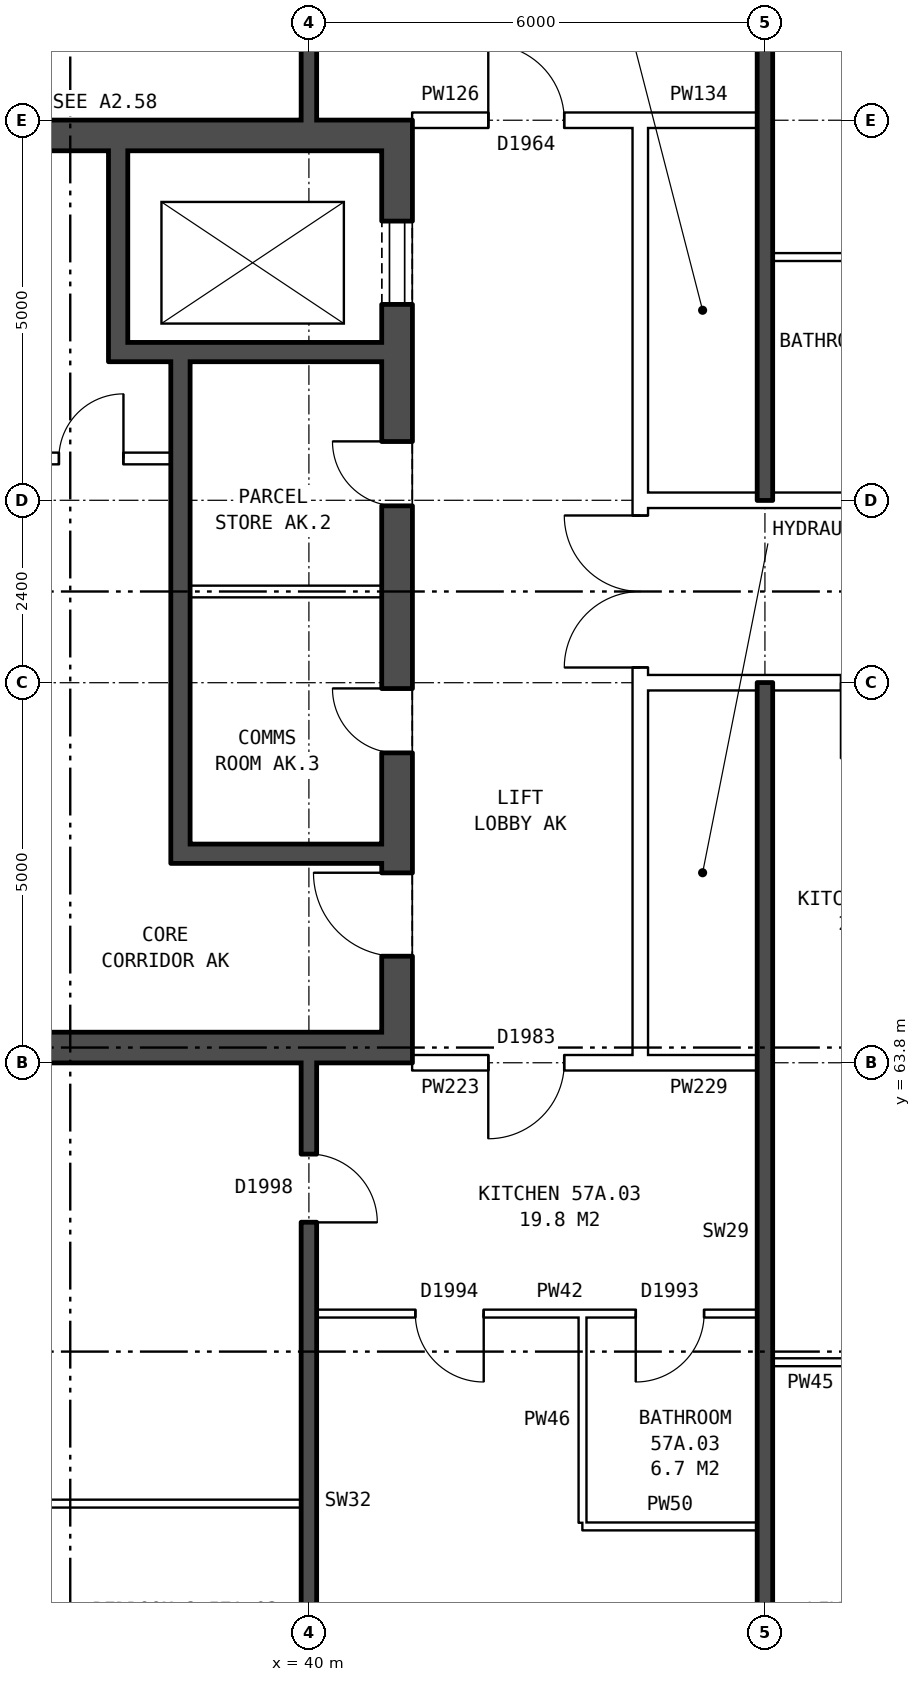
"""IFC4 building model, lengths in metres.
Left out: names, types, materials, properties, quantities, classifications, styles, units other than length and angle.
Written with IfcOpenShell. Run it as: python <this file> out.ifc"""

import sys

from ifc_helpers import new_model, si_unit, direction, frame, frame_2d, origin, place, context, subcontext, project, spatial, rectangle, extrude, element, fill, save


model = new_model("IFC4")
c1 = context("Model", 3, precision=1e-05, world=origin(), true_north=direction((0.0, 1.0)))
c2 = subcontext(c1, "Body", "Model", "MODEL_VIEW")
j1 = project(units=[si_unit("LENGTHUNIT", "METRE"), si_unit("PLANEANGLEUNIT", "RADIAN")], contexts=[c1])
p1 = place(None, origin())
s1 = spatial("IfcSite", under=j1, at=p1, CompositionType="ELEMENT")
p2 = place(p1, origin())
s2 = spatial("IfcBuilding", under=s1, at=p2, CompositionType="ELEMENT")
p3 = place(p2, frame((0.0, 0.0, 202.8)))
s3 = spatial("IfcBuildingStorey", under=s2, at=p3, CompositionType="ELEMENT", Elevation=202.8)
p4 = place(p3, frame((41.16, 76.2, 0.0), z_axis=(0.0, 0.0, 1.0), x_axis=(0.0, -1.0, 0.0)))
e1 = element("IfcWall", 1, at=p4, inside=s3, PredefinedType="SHEAR", context=c2, shape_type="SweptSolid", body=[
    extrude(rectangle(XDim=12.4, YDim=0.4, at=frame_2d((6.2, 0.0))), origin(), (0.0, 0.0, 1.0), 2.85),
])
p5 = place(p4, frame((1.325, 0.0, 0.0)))
e2 = element("IfcOpeningElement", 2, at=p5, cuts=e1, PredefinedType="OPENING", context=c2, shape_type="SweptSolid", body=[
    extrude(rectangle(XDim=1.1, YDim=2.1, at=frame_2d((0.55, 1.05))), frame((0.0, 0.21, 0.0), z_axis=(0.0, -1.0, 0.0), x_axis=(1.0, 0.0, 0.0)), (0.0, 0.0, 1.0), 0.42),
])
p6 = place(p4, frame((4.225, 0.0, 0.0)))
e3 = element("IfcOpeningElement", 3, at=p6, cuts=e1, PredefinedType="OPENING", context=c2, shape_type="SweptSolid", body=[
    extrude(rectangle(XDim=0.85, YDim=2.1, at=frame_2d((0.425, 1.05))), frame((0.0, 0.21, 0.0), z_axis=(0.0, -1.0, 0.0), x_axis=(1.0, 0.0, 0.0)), (0.0, 0.0, 1.0), 0.42),
])
p7 = place(p4, frame((7.475, 0.0, 0.0)))
e4 = element("IfcOpeningElement", 4, at=p7, cuts=e1, PredefinedType="OPENING", context=c2, shape_type="SweptSolid", body=[
    extrude(rectangle(XDim=0.85, YDim=2.1, at=frame_2d((0.425, 1.05))), frame((0.0, 0.21, 0.0), z_axis=(0.0, -1.0, 0.0), x_axis=(1.0, 0.0, 0.0)), (0.0, 0.0, 1.0), 0.42),
])
p8 = place(p4, frame((9.9, 0.0, 0.0)))
e5 = element("IfcOpeningElement", 5, at=p8, cuts=e1, PredefinedType="OPENING", context=c2, shape_type="SweptSolid", body=[
    extrude(rectangle(XDim=1.1, YDim=2.1, at=frame_2d((0.55, 1.05))), frame((0.0, 0.21, 0.0), z_axis=(0.0, -1.0, 0.0), x_axis=(1.0, 0.0, 0.0)), (0.0, 0.0, 1.0), 0.42),
])
for number, where, z_axis, x_axis in (
    (6, (40.96, 76.0, 0.0), (0.0, 0.0, 1.0), (-1.0, 0.0, 0.0)),
    (7, (40.96, 64.0, 0.0), (0.0, 0.0, 1.0), (-1.0, 0.0, 0.0)),
):
    element("IfcWall", number, at=place(p3, frame(where, z_axis=z_axis, x_axis=x_axis)), inside=s3, PredefinedType="SHEAR", context=c2, shape_type="SweptSolid", body=[
        extrude(rectangle(XDim=8.2, YDim=0.4, at=frame_2d((4.1, 0.0))), origin(), (0.0, 0.0, 1.0), 2.85),
    ])
p9 = place(p3, frame((40.96, 73.15, 0.0), z_axis=(0.0, 0.0, 1.0), x_axis=(-1.0, 0.0, 0.0)))
e8 = element("IfcWall", 8, at=p9, inside=s3, PredefinedType="SHEAR", context=c2, shape_type="SweptSolid", body=[
    extrude(rectangle(XDim=3.595, YDim=0.25, at=frame_2d((1.797, 0.0))), origin(), (0.0, 0.0, 1.0), 2.85),
])
p10 = place(p3, frame((38.185, 71.75, 0.0), z_axis=(0.0, 0.0, 1.0), x_axis=(-1.0, 0.0, 0.0)))
e9 = element("IfcWall", 9, at=p10, inside=s3, PredefinedType="PARTITIONING", context=c2, shape_type="SweptSolid", body=[
    extrude(rectangle(XDim=2.1, YDim=0.15, at=frame_2d((1.05, 0.0))), origin(), (0.0, 0.0, 1.0), 2.85),
])
p11 = place(p10, frame((0.625, 0.0, 0.0)))
e10 = element("IfcOpeningElement", 10, at=p11, cuts=e9, PredefinedType="OPENING", context=c2, shape_type="SweptSolid", body=[
    extrude(rectangle(XDim=0.85, YDim=2.1, at=frame_2d((0.425, 1.05))), frame((0.0, 0.085, 0.0), z_axis=(0.0, -1.0, 0.0), x_axis=(1.0, 0.0, 0.0)), (0.0, 0.0, 1.0), 0.17),
])
p12 = place(p3, frame((40.96, 70.0, 0.0), z_axis=(0.0, 0.0, 1.0), x_axis=(-1.0, 0.0, 0.0)))
e11 = element("IfcWall", 11, at=p12, inside=s3, PredefinedType="PARTITIONING", context=c2, shape_type="SweptSolid", body=[
    extrude(rectangle(XDim=2.525, YDim=0.15, at=frame_2d((1.262, 0.0))), origin(), (0.0, 0.0, 1.0), 2.85),
])
p13 = place(p3, frame((40.96, 66.55, 0.0), z_axis=(0.0, 0.0, 1.0), x_axis=(-1.0, 0.0, 0.0)))
e12 = element("IfcWall", 12, at=p13, inside=s3, PredefinedType="SHEAR", context=c2, shape_type="SweptSolid", body=[
    extrude(rectangle(XDim=2.525, YDim=0.25, at=frame_2d((1.262, 0.0))), origin(), (0.0, 0.0, 1.0), 2.85),
])
p14 = place(p3, frame((38.31, 73.025, 0.0), z_axis=(0.0, 0.0, 1.0), x_axis=(0.0, -1.0, 0.0)))
e13 = element("IfcWall", 13, at=p14, inside=s3, PredefinedType="SHEAR", context=c2, shape_type="SweptSolid", body=[
    extrude(rectangle(XDim=6.6, YDim=0.25, at=frame_2d((3.3, 0.0))), origin(), (0.0, 0.0, 1.0), 2.85),
])
p15 = place(p3, frame((37.49, 75.8, 0.0), z_axis=(0.0, 0.0, 1.0), x_axis=(0.0, -1.0, 0.0)))
e14 = element("IfcWall", 14, at=p15, inside=s3, PredefinedType="SHEAR", context=c2, shape_type="SweptSolid", body=[
    extrude(rectangle(XDim=2.525, YDim=0.25, at=frame_2d((1.263, 0.0))), origin(), (0.0, 0.0, 1.0), 2.85),
])
p16 = place(p3, frame((44.36, 63.9, 0.0), z_axis=(0.0, 0.0, 1.0), x_axis=(0.0, 1.0, 0.0)))
e15 = element("IfcWall", 15, at=p16, inside=s3, PredefinedType="PARTITIONING", context=c2, shape_type="SweptSolid", body=[
    extrude(rectangle(XDim=12.2, YDim=0.2, at=frame_2d((6.1, 0.0))), origin(), (0.0, 0.0, 1.0), 2.85),
])
p17 = place(p16, frame((5.1, 0.0, 0.0)))
e16 = element("IfcOpeningElement", 16, at=p17, cuts=e15, PredefinedType="OPENING", context=c2, shape_type="SweptSolid", body=[
    extrude(rectangle(XDim=2.0, YDim=2.1, at=frame_2d((1.0, 1.05))), frame((0.0, 0.11, 0.0), z_axis=(0.0, -1.0, 0.0), x_axis=(1.0, 0.0, 0.0)), (0.0, 0.0, 1.0), 0.22),
])
p18 = place(p3, frame((43.6, 57.7, 0.0), z_axis=(0.0, 0.0, 1.0), x_axis=(1.0, 0.0, 0.0)))
e17 = element("IfcWall", 17, at=p18, inside=s3, PredefinedType="PARTITIONING", context=c2, shape_type="SweptSolid", body=[
    extrude(rectangle(XDim=2.3, YDim=0.1, at=frame_2d((1.15, 0.0))), origin(), (0.0, 0.0, 1.0), 2.85),
])
p19 = place(p3, frame((32.36, 58.0, 0.0), z_axis=(0.0, 0.0, 1.0), x_axis=(1.0, 0.0, 0.0)))
e18 = element("IfcWall", 18, at=p19, inside=s3, PredefinedType="PARTITIONING", context=c2, shape_type="SweptSolid", body=[
    extrude(rectangle(XDim=7.54, YDim=0.1, at=frame_2d((3.77, 0.0))), origin(), (0.0, 0.0, 1.0), 2.85),
])
p20 = place(p19, frame((3.32, 0.0, 0.0)))
e19 = element("IfcOpeningElement", 19, at=p20, cuts=e18, PredefinedType="OPENING", context=c2, shape_type="SweptSolid", body=[
    extrude(rectangle(XDim=0.9, YDim=2.1, at=frame_2d((0.45, 1.05))), frame((0.0, 0.06, 0.0), z_axis=(0.0, -1.0, 0.0), x_axis=(1.0, 0.0, 0.0)), (0.0, 0.0, 1.0), 0.12),
])
p21 = place(p3, frame((46.1, 59.86, 0.0), z_axis=(0.0, 0.0, 1.0), x_axis=(1.0, 0.0, 0.0)))
e20 = element("IfcWall", 20, at=p21, inside=s3, PredefinedType="PARTITIONING", context=c2, shape_type="SweptSolid", body=[
    extrude(rectangle(XDim=2.9, YDim=0.1, at=frame_2d((1.45, 0.0))), origin(), (0.0, 0.0, 1.0), 2.85),
])
p22 = place(p21, frame((1.0, 0.0, 0.0)))
e21 = element("IfcOpeningElement", 21, at=p22, cuts=e20, PredefinedType="OPENING", context=c2, shape_type="SweptSolid", body=[
    extrude(rectangle(XDim=0.9, YDim=2.1, at=frame_2d((0.45, 1.05))), frame((0.0, 0.06, 0.0), z_axis=(0.0, -1.0, 0.0), x_axis=(1.0, 0.0, 0.0)), (0.0, 0.0, 1.0), 0.12),
])
p23 = place(p3, frame((40.1, 60.5, 0.0), z_axis=(0.0, 0.0, 1.0), x_axis=(1.0, 0.0, 0.0)))
e22 = element("IfcWall", 22, at=p23, inside=s3, PredefinedType="PARTITIONING", context=c2, shape_type="SweptSolid", body=[
    extrude(rectangle(XDim=5.8, YDim=0.1, at=frame_2d((2.9, 0.0))), origin(), (0.0, 0.0, 1.0), 2.85),
])
p24 = place(p23, frame((1.3, 0.0, 0.0)))
e23 = element("IfcOpeningElement", 23, at=p24, cuts=e22, PredefinedType="OPENING", context=c2, shape_type="SweptSolid", body=[
    extrude(rectangle(XDim=0.9, YDim=2.1, at=frame_2d((0.45, 1.05))), frame((0.0, 0.06, 0.0), z_axis=(0.0, -1.0, 0.0), x_axis=(1.0, 0.0, 0.0)), (0.0, 0.0, 1.0), 0.12),
])
p25 = place(p23, frame((4.2, 0.0, 0.0)))
e24 = element("IfcOpeningElement", 24, at=p25, cuts=e22, PredefinedType="OPENING", context=c2, shape_type="SweptSolid", body=[
    extrude(rectangle(XDim=0.9, YDim=2.1, at=frame_2d((0.45, 1.05))), frame((0.0, 0.06, 0.0), z_axis=(0.0, -1.0, 0.0), x_axis=(1.0, 0.0, 0.0)), (0.0, 0.0, 1.0), 0.12),
])
p26 = place(p3, frame((41.36, 63.8, 0.0), z_axis=(0.0, 0.0, 1.0), x_axis=(1.0, 0.0, 0.0)))
e25 = element("IfcWall", 25, at=p26, inside=s3, PredefinedType="PARTITIONING", context=c2, shape_type="SweptSolid", body=[
    extrude(rectangle(XDim=3.0, YDim=0.2, at=frame_2d((1.5, 0.0))), origin(), (0.0, 0.0, 1.0), 2.85),
])
p27 = place(p26, frame((1.0, 0.0, 0.0)))
e26 = element("IfcOpeningElement", 26, at=p27, cuts=e25, PredefinedType="OPENING", context=c2, shape_type="SweptSolid", body=[
    extrude(rectangle(XDim=1.0, YDim=2.1, at=frame_2d((0.5, 1.05))), frame((0.0, 0.11, 0.0), z_axis=(0.0, -1.0, 0.0), x_axis=(1.0, 0.0, 0.0)), (0.0, 0.0, 1.0), 0.22),
])
p28 = place(p3, frame((44.36, 63.8, 0.0), z_axis=(0.0, 0.0, 1.0), x_axis=(1.0, 0.0, 0.0)))
e27 = element("IfcWall", 27, at=p28, inside=s3, PredefinedType="PARTITIONING", context=c2, shape_type="SweptSolid", body=[
    extrude(rectangle(XDim=1.54, YDim=0.2, at=frame_2d((0.77, 0.0))), origin(), (0.0, 0.0, 1.0), 2.85),
])
p29 = place(p3, frame((44.36, 68.8, 0.0), z_axis=(0.0, 0.0, 1.0), x_axis=(1.0, 0.0, 0.0)))
e28 = element("IfcWall", 28, at=p29, inside=s3, PredefinedType="PARTITIONING", context=c2, shape_type="SweptSolid", body=[
    extrude(rectangle(XDim=19.28, YDim=0.2, at=frame_2d((9.64, 0.0))), origin(), (0.0, 0.0, 1.0), 2.85),
])
p30 = place(p29, frame((14.64, 0.0, 0.0)))
e29 = element("IfcOpeningElement", 29, at=p30, cuts=e28, PredefinedType="OPENING", context=c2, shape_type="SweptSolid", body=[
    extrude(rectangle(XDim=1.0, YDim=2.1, at=frame_2d((0.5, 1.05))), frame((0.0, 0.11, 0.0), z_axis=(0.0, -1.0, 0.0), x_axis=(1.0, 0.0, 0.0)), (0.0, 0.0, 1.0), 0.22),
])
p31 = place(p29, frame((8.64, 0.0, 0.0)))
e30 = element("IfcOpeningElement", 30, at=p31, cuts=e28, PredefinedType="OPENING", context=c2, shape_type="SweptSolid", body=[
    extrude(rectangle(XDim=1.0, YDim=2.1, at=frame_2d((0.5, 1.05))), frame((0.0, 0.11, 0.0), z_axis=(0.0, -1.0, 0.0), x_axis=(1.0, 0.0, 0.0)), (0.0, 0.0, 1.0), 0.22),
])
p32 = place(p29, frame((2.64, 0.0, 0.0)))
e31 = element("IfcOpeningElement", 31, at=p32, cuts=e28, PredefinedType="OPENING", context=c2, shape_type="SweptSolid", body=[
    extrude(rectangle(XDim=1.0, YDim=2.1, at=frame_2d((0.5, 1.05))), frame((0.0, 0.11, 0.0), z_axis=(0.0, -1.0, 0.0), x_axis=(1.0, 0.0, 0.0)), (0.0, 0.0, 1.0), 0.22),
])
p33 = place(p3, frame((44.36, 71.2, 0.0), z_axis=(0.0, 0.0, 1.0), x_axis=(1.0, 0.0, 0.0)))
e32 = element("IfcWall", 32, at=p33, inside=s3, PredefinedType="PARTITIONING", context=c2, shape_type="SweptSolid", body=[
    extrude(rectangle(XDim=19.28, YDim=0.2, at=frame_2d((9.64, 0.0))), origin(), (0.0, 0.0, 1.0), 2.85),
])
p34 = place(p33, frame((14.64, 0.0, 0.0)))
e33 = element("IfcOpeningElement", 33, at=p34, cuts=e32, PredefinedType="OPENING", context=c2, shape_type="SweptSolid", body=[
    extrude(rectangle(XDim=1.0, YDim=2.1, at=frame_2d((0.5, 1.05))), frame((0.0, 0.11, 0.0), z_axis=(0.0, -1.0, 0.0), x_axis=(1.0, 0.0, 0.0)), (0.0, 0.0, 1.0), 0.22),
])
p35 = place(p33, frame((5.64, 0.0, 0.0)))
e34 = element("IfcOpeningElement", 34, at=p35, cuts=e32, PredefinedType="OPENING", context=c2, shape_type="SweptSolid", body=[
    extrude(rectangle(XDim=1.0, YDim=2.1, at=frame_2d((0.5, 1.05))), frame((0.0, 0.11, 0.0), z_axis=(0.0, -1.0, 0.0), x_axis=(1.0, 0.0, 0.0)), (0.0, 0.0, 1.0), 0.22),
])
p36 = place(p3, frame((46.1, 74.4, 0.0), z_axis=(0.0, 0.0, 1.0), x_axis=(1.0, 0.0, 0.0)))
e35 = element("IfcWall", 35, at=p36, inside=s3, PredefinedType="PARTITIONING", context=c2, shape_type="SweptSolid", body=[
    extrude(rectangle(XDim=2.9, YDim=0.1, at=frame_2d((1.45, 0.0))), origin(), (0.0, 0.0, 1.0), 2.85),
])
p37 = place(p3, frame((41.36, 76.2, 0.0), z_axis=(0.0, 0.0, 1.0), x_axis=(1.0, 0.0, 0.0)))
e36 = element("IfcWall", 36, at=p37, inside=s3, PredefinedType="PARTITIONING", context=c2, shape_type="SweptSolid", body=[
    extrude(rectangle(XDim=3.0, YDim=0.2, at=frame_2d((1.5, 0.0))), origin(), (0.0, 0.0, 1.0), 2.85),
])
p38 = place(p37, frame((1.0, 0.0, 0.0)))
e37 = element("IfcOpeningElement", 37, at=p38, cuts=e36, PredefinedType="OPENING", context=c2, shape_type="SweptSolid", body=[
    extrude(rectangle(XDim=1.0, YDim=2.1, at=frame_2d((0.5, 1.05))), frame((0.0, 0.11, 0.0), z_axis=(0.0, -1.0, 0.0), x_axis=(1.0, 0.0, 0.0)), (0.0, 0.0, 1.0), 0.22),
])
p39 = place(p3, frame((44.36, 76.2, 0.0), z_axis=(0.0, 0.0, 1.0), x_axis=(1.0, 0.0, 0.0)))
e38 = element("IfcWall", 38, at=p39, inside=s3, PredefinedType="PARTITIONING", context=c2, shape_type="SweptSolid", body=[
    extrude(rectangle(XDim=1.54, YDim=0.2, at=frame_2d((0.77, 0.0))), origin(), (0.0, 0.0, 1.0), 2.85),
])
p40 = place(p3, frame((40.0, 54.36, 0.0), z_axis=(0.0, 0.0, 1.0), x_axis=(0.0, 1.0, 0.0)))
e39 = element("IfcWall", 39, at=p40, inside=s3, PredefinedType="SOLIDWALL", context=c2, shape_type="SweptSolid", body=[
    extrude(rectangle(XDim=9.44, YDim=0.2, at=frame_2d((4.72, 0.0))), origin(), (0.0, 0.0, 1.0), 2.85),
])
p41 = place(p40, frame((7.34, 0.0, 0.0)))
e40 = element("IfcOpeningElement", 40, at=p41, cuts=e39, PredefinedType="OPENING", context=c2, shape_type="SweptSolid", body=[
    extrude(rectangle(XDim=0.9, YDim=2.1, at=frame_2d((0.45, 1.05))), frame((0.0, 0.11, 0.0), z_axis=(0.0, -1.0, 0.0), x_axis=(1.0, 0.0, 0.0)), (0.0, 0.0, 1.0), 0.22),
])
p42 = place(p3, frame((40.0, 76.2, 0.0), z_axis=(0.0, 0.0, 1.0), x_axis=(0.0, 1.0, 0.0)))
e41 = element("IfcWall", 41, at=p42, inside=s3, PredefinedType="SOLIDWALL", context=c2, shape_type="SweptSolid", body=[
    extrude(rectangle(XDim=9.44, YDim=0.2, at=frame_2d((4.72, 0.0))), origin(), (0.0, 0.0, 1.0), 2.85),
])
p43 = place(p42, frame((1.5, 0.0, 0.0)))
e42 = element("IfcOpeningElement", 42, at=p43, cuts=e41, PredefinedType="OPENING", context=c2, shape_type="SweptSolid", body=[
    extrude(rectangle(XDim=0.9, YDim=2.1, at=frame_2d((0.45, 1.05))), frame((0.0, 0.11, 0.0), z_axis=(0.0, -1.0, 0.0), x_axis=(1.0, 0.0, 0.0)), (0.0, 0.0, 1.0), 0.22),
])
p44 = place(p3, frame((43.6, 57.75, 0.0), z_axis=(0.0, 0.0, 1.0), x_axis=(0.0, 1.0, 0.0)))
e43 = element("IfcWall", 43, at=p44, inside=s3, PredefinedType="PARTITIONING", context=c2, shape_type="SweptSolid", body=[
    extrude(rectangle(XDim=2.7, YDim=0.1, at=frame_2d((1.35, 0.0))), origin(), (0.0, 0.0, 1.0), 2.85),
])
for number, where, z_axis, x_axis in (
    (44, (46.0, 54.36, 0.0), (0.0, 0.0, 1.0), (0.0, 1.0, 0.0)),
    (45, (46.0, 71.2, 0.0), (0.0, 0.0, 1.0), (0.0, 1.0, 0.0)),
):
    element("IfcWall", number, at=place(p3, frame(where, z_axis=z_axis, x_axis=x_axis)), inside=s3, PredefinedType="SOLIDWALL", context=c2, shape_type="SweptSolid", body=[
        extrude(rectangle(XDim=14.44, YDim=0.2, at=frame_2d((7.22, 0.0))), origin(), (0.0, 0.0, 1.0), 2.85),
    ])
p45 = place(p5, origin())
e46 = element("IfcDoor", 46, at=p45, inside=s3, OperationType="DOUBLE_DOOR_SLIDING", PredefinedType="DOOR", context=c2, shape_type="SweptSolid", body=[
    extrude(rectangle(XDim=1.1, YDim=2.1, at=frame_2d((0.55, 1.05))), frame((0.0, -0.135, 0.0), z_axis=(0.0, -1.0, 0.0), x_axis=(1.0, 0.0, 0.0)), (0.0, 0.0, 1.0), 0.05),
])
fill(e2, e46)
p46 = place(p6, frame((0.85, 0.0, 0.0), z_axis=(0.0, 0.0, 1.0), x_axis=(-1.0, 0.0, 0.0)))
e47 = element("IfcDoor", 47, at=p46, inside=s3, OperationType="SINGLE_SWING_RIGHT", PredefinedType="DOOR", context=c2, shape_type="SweptSolid", body=[
    extrude(rectangle(XDim=0.85, YDim=2.1, at=frame_2d((0.425, 1.05))), frame((0.0, 0.185, 0.0), z_axis=(0.0, -1.0, 0.0), x_axis=(1.0, 0.0, 0.0)), (0.0, 0.0, 1.0), 0.05),
])
fill(e3, e47)
p47 = place(p7, frame((0.85, 0.0, 0.0), z_axis=(0.0, 0.0, 1.0), x_axis=(-1.0, 0.0, 0.0)))
e48 = element("IfcDoor", 48, at=p47, inside=s3, OperationType="SINGLE_SWING_RIGHT", PredefinedType="DOOR", context=c2, shape_type="SweptSolid", body=[
    extrude(rectangle(XDim=0.85, YDim=2.1, at=frame_2d((0.425, 1.05))), frame((0.0, 0.185, 0.0), z_axis=(0.0, -1.0, 0.0), x_axis=(1.0, 0.0, 0.0)), (0.0, 0.0, 1.0), 0.05),
])
fill(e4, e48)
p48 = place(p8, frame((1.1, 0.0, 0.0), z_axis=(0.0, 0.0, 1.0), x_axis=(-1.0, 0.0, 0.0)))
e49 = element("IfcDoor", 49, at=p48, inside=s3, OperationType="SINGLE_SWING_RIGHT", PredefinedType="DOOR", context=c2, shape_type="SweptSolid", body=[
    extrude(rectangle(XDim=1.1, YDim=2.1, at=frame_2d((0.55, 1.05))), frame((0.0, 0.185, 0.0), z_axis=(0.0, -1.0, 0.0), x_axis=(1.0, 0.0, 0.0)), (0.0, 0.0, 1.0), 0.05),
])
fill(e5, e49)
p49 = place(p11, frame((0.85, 0.0, 0.0), z_axis=(0.0, 0.0, 1.0), x_axis=(-1.0, 0.0, 0.0)))
e50 = element("IfcDoor", 50, at=p49, inside=s3, OperationType="SINGLE_SWING_RIGHT", PredefinedType="DOOR", context=c2, shape_type="SweptSolid", body=[
    extrude(rectangle(XDim=0.85, YDim=2.1, at=frame_2d((0.425, 1.05))), frame((0.0, 0.025, 0.0), z_axis=(0.0, -1.0, 0.0), x_axis=(1.0, 0.0, 0.0)), (0.0, 0.0, 1.0), 0.05),
])
fill(e10, e50)
p50 = place(p17, origin())
e51 = element("IfcDoor", 51, at=p50, inside=s3, OperationType="DOUBLE_DOOR_SINGLE_SWING", PredefinedType="DOOR", context=c2, shape_type="SweptSolid", body=[
    extrude(rectangle(XDim=2.0, YDim=2.1, at=frame_2d((1.0, 1.05))), frame((0.0, 0.025, 0.0), z_axis=(0.0, -1.0, 0.0), x_axis=(1.0, 0.0, 0.0)), (0.0, 0.0, 1.0), 0.05),
])
fill(e16, e51)
p51 = place(p24, frame((0.9, 0.0, 0.0), z_axis=(0.0, 0.0, 1.0), x_axis=(-1.0, 0.0, 0.0)))
e52 = element("IfcDoor", 52, at=p51, inside=s3, OperationType="SINGLE_SWING_LEFT", PredefinedType="DOOR", context=c2, shape_type="SweptSolid", body=[
    extrude(rectangle(XDim=0.9, YDim=2.1, at=frame_2d((0.45, 1.05))), frame((0.0, 0.025, 0.0), z_axis=(0.0, -1.0, 0.0), x_axis=(1.0, 0.0, 0.0)), (0.0, 0.0, 1.0), 0.05),
])
fill(e23, e52)
p52 = place(p27, frame((1.0, 0.0, 0.0), z_axis=(0.0, 0.0, 1.0), x_axis=(-1.0, 0.0, 0.0)))
e53 = element("IfcDoor", 53, at=p52, inside=s3, OperationType="SINGLE_SWING_RIGHT", PredefinedType="DOOR", context=c2, shape_type="SweptSolid", body=[
    extrude(rectangle(XDim=1.0, YDim=2.1, at=frame_2d((0.5, 1.05))), frame((0.0, 0.025, 0.0), z_axis=(0.0, -1.0, 0.0), x_axis=(1.0, 0.0, 0.0)), (0.0, 0.0, 1.0), 0.05),
])
fill(e26, e53)
p53 = place(p41, frame((0.9, 0.0, 0.0), z_axis=(0.0, 0.0, 1.0), x_axis=(-1.0, 0.0, 0.0)))
e54 = element("IfcDoor", 54, at=p53, inside=s3, OperationType="SINGLE_SWING_RIGHT", PredefinedType="DOOR", context=c2, shape_type="SweptSolid", body=[
    extrude(rectangle(XDim=0.9, YDim=2.1, at=frame_2d((0.45, 1.05))), frame((0.0, 0.025, 0.0), z_axis=(0.0, -1.0, 0.0), x_axis=(1.0, 0.0, 0.0)), (0.0, 0.0, 1.0), 0.05),
])
fill(e40, e54)
p54 = place(p25, frame((0.9, 0.0, 0.0), z_axis=(0.0, 0.0, 1.0), x_axis=(-1.0, 0.0, 0.0)))
e55 = element("IfcDoor", 55, at=p54, inside=s3, OperationType="SINGLE_SWING_RIGHT", PredefinedType="DOOR", context=c2, shape_type="SweptSolid", body=[
    extrude(rectangle(XDim=0.9, YDim=2.1, at=frame_2d((0.45, 1.05))), frame((0.0, 0.025, 0.0), z_axis=(0.0, -1.0, 0.0), x_axis=(1.0, 0.0, 0.0)), (0.0, 0.0, 1.0), 0.05),
])
fill(e24, e55)
p55 = place(p38, origin())
e56 = element("IfcDoor", 56, at=p55, inside=s3, OperationType="SINGLE_SWING_LEFT", PredefinedType="DOOR", context=c2, shape_type="SweptSolid", body=[
    extrude(rectangle(XDim=1.0, YDim=2.1, at=frame_2d((0.5, 1.05))), frame((0.0, 0.025, 0.0), z_axis=(0.0, -1.0, 0.0), x_axis=(1.0, 0.0, 0.0)), (0.0, 0.0, 1.0), 0.05),
])
fill(e37, e56)
save(model, sys.argv[1])
